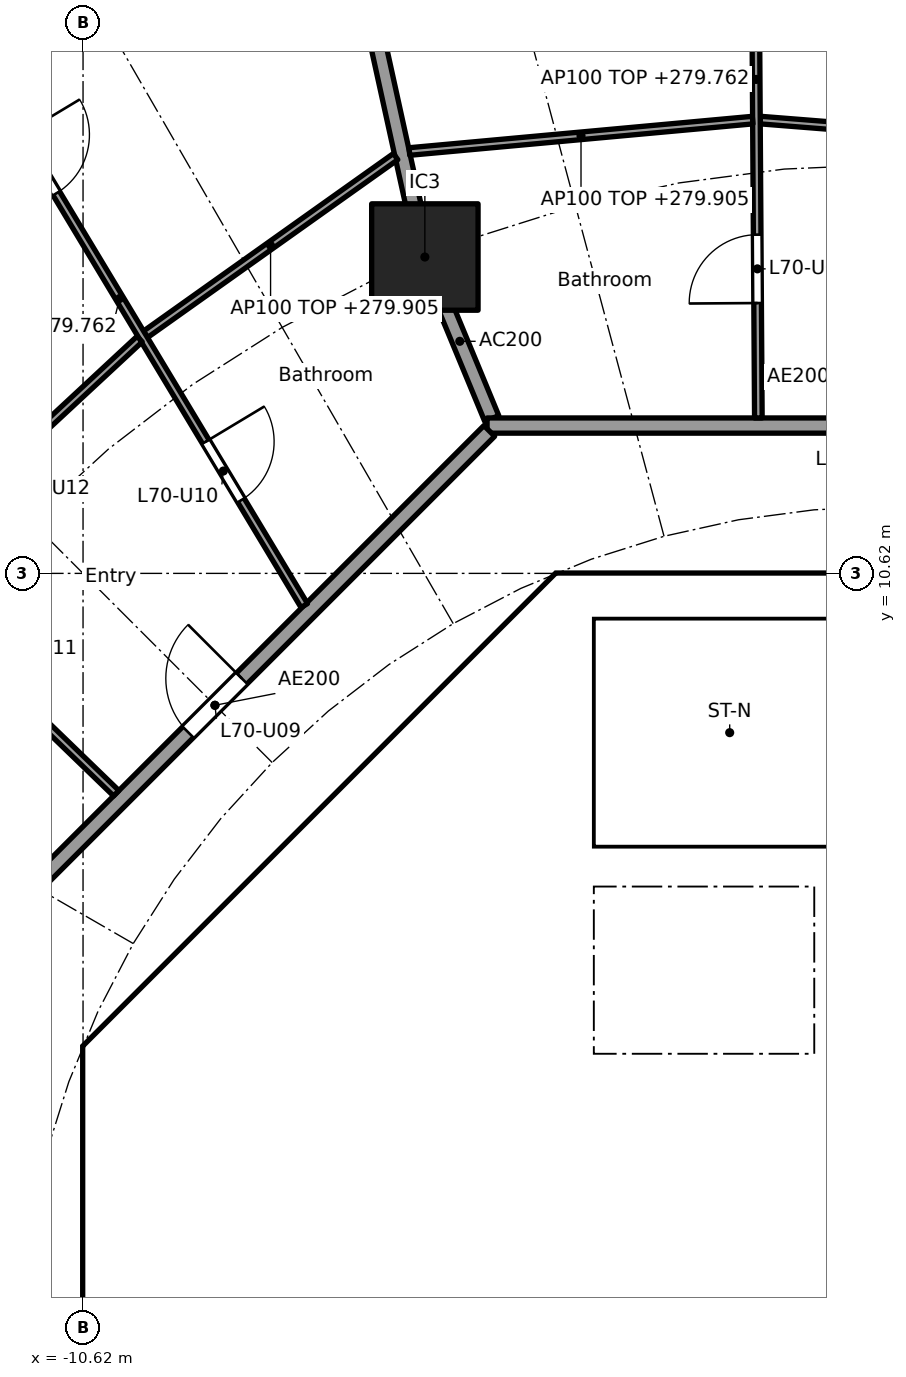
"""IFC4 building model, lengths in metres.
Left out: names, types, materials, properties, quantities, classifications, styles, units other than length and angle.
Written with IfcOpenShell. Run it as: python <this file> out.ifc"""

import sys

from ifc_helpers import new_model, si_unit, direction, frame, frame_2d, origin, origin_2d, place, context, subcontext, project, spatial, polyline, rectangle, outline, extrude, element, fill, save


model = new_model("IFC4")
c1 = context("Model", 3, precision=1e-05, world=origin(), true_north=direction((0.0, 1.0)))
c2 = subcontext(c1, "Body", "Model", "MODEL_VIEW")
j1 = project(units=[si_unit("LENGTHUNIT", "METRE"), si_unit("PLANEANGLEUNIT", "RADIAN")], contexts=[c1])
p1 = place(None, origin())
s1 = spatial("IfcSite", under=j1, at=p1, CompositionType="ELEMENT")
p2 = place(p1, origin())
s2 = spatial("IfcBuilding", under=s1, at=p2, CompositionType="ELEMENT")
p3 = place(p2, frame((0.0, 0.0, 277.0)))
s3 = spatial("IfcBuildingStorey", under=s2, at=p3, CompositionType="ELEMENT", Elevation=277.0)
p4 = place(p3, frame((-6.123, 14.782, 0.0), z_axis=(0.0, 0.0, 1.0), x_axis=(1.0, 0.0, 0.0)))
e1 = element("IfcColumn", 1, at=p4, inside=s3, PredefinedType="COLUMN", context=c2, shape_type="SweptSolid", body=[
    extrude(rectangle(XDim=1.4, YDim=1.4, at=origin_2d()), origin(), (0.0, 0.0, 1.0), 3.7),
])
p5 = place(p3, frame((-4.613, 9.988, 0.0), z_axis=(0.0, 0.0, 1.0), x_axis=(-0.707106781187, -0.707106781187, 0.0)))
e2 = element("IfcWall", 2, at=p5, inside=s3, PredefinedType="SHEAR", context=c2, shape_type="SweptSolid", body=[
    extrude(rectangle(XDim=7.602, YDim=0.6, at=frame_2d((3.801, 0.0))), origin(), (0.0, 0.0, 1.0), 3.44),
])
p6 = place(p5, frame((0.351, 0.0, 0.0)))
e3 = element("IfcOpeningElement", 3, at=p6, cuts=e2, PredefinedType="OPENING", context=c2, shape_type="SweptSolid", body=[
    extrude(rectangle(XDim=1.1, YDim=2.1, at=frame_2d((0.55, 1.05))), frame((0.0, 0.31, 0.0), z_axis=(0.0, -1.0, 0.0), x_axis=(1.0, 0.0, 0.0)), (0.0, 0.0, 1.0), 0.62),
])
p7 = place(p3, frame((-10.325, 3.801, 0.0), z_axis=(0.0, 0.0, 1.0), x_axis=(0.0, -1.0, 0.0)))
e4 = element("IfcWall", 4, at=p7, inside=s3, PredefinedType="SHEAR", context=c2, shape_type="SweptSolid", body=[
    extrude(rectangle(XDim=7.602, YDim=0.6, at=frame_2d((3.801, 0.0))), origin(), (0.0, 0.0, 1.0), 3.44),
])
p8 = place(p7, frame((0.651, 0.0, 0.0)))
e5 = element("IfcOpeningElement", 5, at=p8, cuts=e4, PredefinedType="OPENING", context=c2, shape_type="SweptSolid", body=[
    extrude(rectangle(XDim=1.5, YDim=2.1, at=frame_2d((0.75, 1.05))), frame((0.0, 0.31, 0.0), z_axis=(0.0, -1.0, 0.0), x_axis=(1.0, 0.0, 0.0)), (0.0, 0.0, 1.0), 0.62),
])
p9 = place(p7, frame((5.451, 0.0, 0.0)))
e6 = element("IfcOpeningElement", 6, at=p9, cuts=e4, PredefinedType="OPENING", context=c2, shape_type="SweptSolid", body=[
    extrude(rectangle(XDim=1.5, YDim=2.1, at=frame_2d((0.75, 1.05))), frame((0.0, 0.31, 0.0), z_axis=(0.0, -1.0, 0.0), x_axis=(1.0, 0.0, 0.0)), (0.0, 0.0, 1.0), 0.62),
])
p10 = place(p3, frame((-5.8, 4.3, 0.0), z_axis=(0.0, 0.0, 1.0), x_axis=(0.0, 1.0, 0.0)))
e7 = element("IfcWall", 7, at=p10, inside=s3, PredefinedType="PARTITIONING", context=c2, shape_type="SweptSolid", body=[
    extrude(rectangle(XDim=3.927, YDim=0.15, at=frame_2d((1.963, 0.0))), origin(), (0.0, 0.0, 1.0), 3.44),
])
p11 = place(p10, frame((0.262, 0.0, 0.0)))
e8 = element("IfcOpeningElement", 8, at=p11, cuts=e7, PredefinedType="OPENING", context=c2, shape_type="SweptSolid", body=[
    extrude(rectangle(XDim=0.9, YDim=2.1, at=frame_2d((0.45, 1.05))), frame((0.0, 0.085, 0.0), z_axis=(0.0, -1.0, 0.0), x_axis=(1.0, 0.0, 0.0)), (0.0, 0.0, 1.0), 0.17),
])
p12 = place(p10, frame((2.338, 0.0, 0.0)))
e9 = element("IfcOpeningElement", 9, at=p12, cuts=e7, PredefinedType="OPENING", context=c2, shape_type="SweptSolid", body=[
    extrude(rectangle(XDim=0.9, YDim=2.1, at=frame_2d((0.45, 1.05))), frame((0.0, 0.085, 0.0), z_axis=(0.0, -1.0, 0.0), x_axis=(1.0, 0.0, 0.0)), (0.0, 0.0, 1.0), 0.17),
])
p13 = place(p3, frame((-4.0, 4.3, 0.0), z_axis=(0.0, 0.0, 1.0), x_axis=(0.0, 1.0, 0.0)))
e10 = element("IfcWall", 10, at=p13, inside=s3, PredefinedType="SOLIDWALL", context=c2, shape_type="SweptSolid", body=[
    extrude(rectangle(XDim=2.2, YDim=0.2, at=frame_2d((1.1, 0.0))), origin(), (0.0, 0.0, 1.0), 3.44),
])
p14 = place(p13, frame((0.55, 0.0, 0.0)))
e11 = element("IfcOpeningElement", 11, at=p14, cuts=e10, PredefinedType="OPENING", context=c2, shape_type="SweptSolid", body=[
    extrude(rectangle(XDim=1.1, YDim=2.1, at=frame_2d((0.55, 1.05))), frame((0.0, 0.11, 0.0), z_axis=(0.0, -1.0, 0.0), x_axis=(1.0, 0.0, 0.0)), (0.0, 0.0, 1.0), 0.22),
])
p15 = place(p3, frame((-6.7, 2.0, 0.0), z_axis=(0.0, 0.0, 1.0), x_axis=(1.0, 0.0, 0.0)))
e12 = element("IfcWall", 12, at=p15, inside=s3, PredefinedType="SOLIDWALL", context=c2, shape_type="SweptSolid", body=[
    extrude(rectangle(XDim=13.4, YDim=0.2, at=frame_2d((6.7, 0.0))), origin(), (0.0, 0.0, 1.0), 3.44),
])
p16 = place(p15, frame((11.65, 0.0, 0.0)))
e13 = element("IfcOpeningElement", 13, at=p16, cuts=e12, PredefinedType="OPENING", context=c2, shape_type="SweptSolid", body=[
    extrude(rectangle(XDim=1.1, YDim=2.1, at=frame_2d((0.55, 1.05))), frame((0.0, 0.11, 0.0), z_axis=(0.0, -1.0, 0.0), x_axis=(1.0, 0.0, 0.0)), (0.0, 0.0, 1.0), 0.22),
])
p17 = place(p15, frame((1.85, 0.0, 0.0)))
e14 = element("IfcOpeningElement", 14, at=p17, cuts=e12, PredefinedType="OPENING", context=c2, shape_type="SweptSolid", body=[
    extrude(rectangle(XDim=0.9, YDim=2.1, at=frame_2d((0.45, 1.05))), frame((0.0, 0.11, 0.0), z_axis=(0.0, -1.0, 0.0), x_axis=(1.0, 0.0, 0.0)), (0.0, 0.0, 1.0), 0.22),
])
p18 = place(p15, frame((5.15, 0.0, 0.0)))
e15 = element("IfcOpeningElement", 15, at=p18, cuts=e12, PredefinedType="OPENING", context=c2, shape_type="SweptSolid", body=[
    extrude(rectangle(XDim=0.9, YDim=2.1, at=frame_2d((0.45, 1.05))), frame((0.0, 0.11, 0.0), z_axis=(0.0, -1.0, 0.0), x_axis=(1.0, 0.0, 0.0)), (0.0, 0.0, 1.0), 0.22),
])
p19 = place(p15, frame((8.45, 0.0, 0.0)))
e16 = element("IfcOpeningElement", 16, at=p19, cuts=e12, PredefinedType="OPENING", context=c2, shape_type="SweptSolid", body=[
    extrude(rectangle(XDim=0.9, YDim=2.1, at=frame_2d((0.45, 1.05))), frame((0.0, 0.11, 0.0), z_axis=(0.0, -1.0, 0.0), x_axis=(1.0, 0.0, 0.0)), (0.0, 0.0, 1.0), 0.22),
])
p20 = place(p3, origin())
e17 = element("IfcWall", 17, at=p20, inside=s3, PredefinedType="SHEAR", context=c2, shape_type="SweptSolid", body=[
    extrude(outline(polyline([(-10.2, 4.825), (-9.776, 4.401), (-10.025, 4.152), (-10.025, 3.801), (-10.625, 3.801), (-10.625, 4.401), (-10.2, 4.825)])), origin(), (0.0, 0.0, 1.0), 3.44),
])
p21 = place(p3, origin())
e18 = element("IfcWall", 18, at=p21, inside=s3, PredefinedType="SHEAR", context=c2, shape_type="SweptSolid", body=[
    extrude(outline(polyline([(-4.152, 10.025), (-4.401, 9.776), (-4.825, 10.2), (-4.401, 10.625), (4.401, 10.625), (4.825, 10.2), (4.401, 9.776), (4.152, 10.025), (-4.152, 10.025)])), origin(), (0.0, 0.0, 1.0), 3.44),
])
p22 = place(p3, frame((-10.025, 4.0, 0.0), z_axis=(0.0, 0.0, 1.0), x_axis=(1.0, 0.0, 0.0)))
e19 = element("IfcWall", 19, at=p22, inside=s3, PredefinedType="PARTITIONING", context=c2, shape_type="SweptSolid", body=[
    extrude(rectangle(XDim=3.325, YDim=0.2, at=frame_2d((1.662, 0.0))), origin(), (0.0, 0.0, 1.0), 3.44),
])
p23 = place(p3, frame((-8.301, 5.8, 0.0), z_axis=(0.0, 0.0, 1.0), x_axis=(1.0, 0.0, 0.0)))
e20 = element("IfcWall", 20, at=p23, inside=s3, PredefinedType="PARTITIONING", context=c2, shape_type="SweptSolid", body=[
    extrude(rectangle(XDim=2.426, YDim=0.15, at=frame_2d((1.213, 0.0))), origin(), (0.0, 0.0, 1.0), 3.44),
])
p24 = place(p3, frame((-0.9, 4.3, 0.0), z_axis=(0.0, 0.0, 1.0), x_axis=(0.0, 1.0, 0.0)))
e21 = element("IfcWall", 21, at=p24, inside=s3, PredefinedType="SOLIDWALL", context=c2, shape_type="SweptSolid", body=[
    extrude(rectangle(XDim=2.2, YDim=0.2, at=frame_2d((1.1, 0.0))), origin(), (0.0, 0.0, 1.0), 3.44),
])
p25 = place(p3, origin())
e22 = element("IfcWall", 22, at=p25, inside=s3, PredefinedType="SOLIDWALL", context=c2, shape_type="SweptSolid", body=[
    extrude(outline(polyline([(-6.7, 4.3), (6.7, 4.3), (6.7, 2.1), (6.5, 2.1), (6.5, 4.1), (4.5, 4.1), (4.5, 2.1), (4.3, 2.1), (4.3, 4.1), (0.1, 4.1), (0.1, 2.1), (-0.1, 2.1), (-0.1, 4.1), (-2.1, 4.1), (-2.1, 2.1), (-2.3, 2.1), (-2.3, 4.1), (-6.5, 4.1), (-6.5, 2.1), (-6.7, 2.1), (-6.7, 4.3)])), origin(), (0.0, 0.0, 1.0), 3.44),
])
p26 = place(p3, origin())
e23 = element("IfcWall", 23, at=p26, inside=s3, PredefinedType="SOLIDWALL", context=c2, shape_type="SweptSolid", body=[
    extrude(outline(polyline([(-3.9, 7.025), (-4.1, 7.025), (-4.1, 10.025), (-3.9, 10.025), (-3.9, 7.025)])), origin(), (0.0, 0.0, 1.0), 3.44),
])
p27 = place(p3, origin())
e24 = element("IfcWall", 24, at=p27, inside=s3, PredefinedType="SOLIDWALL", context=c2, shape_type="SweptSolid", body=[
    extrude(outline(polyline([(4.1, 6.5), (-4.1, 6.5), (-4.1, 7.025), (4.1, 7.025), (4.1, 6.5)])), origin(), (0.0, 0.0, 1.0), 3.44),
])
p28 = place(p3, frame((-5.243, 12.657, 0.0), z_axis=(0.0, 0.0, 1.0), x_axis=(-0.38273085373, 0.923859888513, 0.0)))
e25 = element("IfcWall", 25, at=p28, inside=s3, PredefinedType="PARTITIONING", context=c2, shape_type="SweptSolid", body=[
    extrude(rectangle(XDim=2.199, YDim=0.2, at=frame_2d((1.1, 0.0))), origin(), (0.0, 0.0, 1.0), 3.44),
])
p29 = place(p3, frame((-6.134, 14.831, 0.0), z_axis=(0.0, 0.0, 1.0), x_axis=(-0.214842475666, 0.976648714047, 0.0)))
e26 = element("IfcWall", 26, at=p29, inside=s3, PredefinedType="PARTITIONING", context=c2, shape_type="SweptSolid", body=[
    extrude(rectangle(XDim=6.031, YDim=0.2, at=frame_2d((3.015, 0.0))), origin(), (0.0, 0.0, 1.0), 2.905),
])
p30 = place(p3, frame((5.104, 12.565, 0.0), z_axis=(0.0, 0.0, 1.0), x_axis=(-1.0, 0.0, 0.0)))
e27 = element("IfcWall", 27, at=p30, inside=s3, PredefinedType="PARTITIONING", context=c2, shape_type="SweptSolid", body=[
    extrude(rectangle(XDim=10.409, YDim=0.2, at=frame_2d((5.205, 0.0))), origin(), (0.0, 0.0, 1.0), 3.44),
])
p31 = place(p30, frame((4.604, 0.0, 0.0)))
e28 = element("IfcOpeningElement", 28, at=p31, cuts=e27, PredefinedType="OPENING", context=c2, shape_type="SweptSolid", body=[
    extrude(rectangle(XDim=1.0, YDim=2.1, at=frame_2d((0.5, 1.05))), frame((0.0, 0.11, 0.0), z_axis=(0.0, -1.0, 0.0), x_axis=(1.0, 0.0, 0.0)), (0.0, 0.0, 1.0), 0.22),
])
p32 = place(p3, frame((-5.275, 12.494, 0.0), z_axis=(0.0, 0.0, 1.0), x_axis=(-0.707106781187, -0.707106781187, 0.0)))
e29 = element("IfcWall", 29, at=p32, inside=s3, PredefinedType="PARTITIONING", context=c2, shape_type="SweptSolid", body=[
    extrude(rectangle(XDim=10.209, YDim=0.2, at=frame_2d((5.104, 0.0))), origin(), (0.0, 0.0, 1.0), 3.44),
])
p33 = place(p32, frame((4.604, 0.0, 0.0)))
e30 = element("IfcOpeningElement", 30, at=p33, cuts=e29, PredefinedType="OPENING", context=c2, shape_type="SweptSolid", body=[
    extrude(rectangle(XDim=1.0, YDim=2.1, at=frame_2d((0.5, 1.05))), frame((0.0, 0.11, 0.0), z_axis=(0.0, -1.0, 0.0), x_axis=(1.0, 0.0, 0.0)), (0.0, 0.0, 1.0), 0.22),
])
p34 = place(p3, frame((2.713, 16.233, 0.0), z_axis=(0.0, 0.0, 1.0), x_axis=(-0.996870142942, 0.079056423588, 0.0)))
e31 = element("IfcWall", 31, at=p34, inside=s3, PredefinedType="PARTITIONING", context=c2, shape_type="SweptSolid", body=[
    extrude(rectangle(XDim=4.438, YDim=0.1, at=frame_2d((2.219, 0.0))), origin(), (0.0, 0.0, 1.0), 2.905),
])
p35 = place(p34, frame((1.794, 0.0, 0.0)))
e32 = element("IfcOpeningElement", 32, at=p35, cuts=e31, PredefinedType="OPENING", context=c2, shape_type="SweptSolid", body=[
    extrude(rectangle(XDim=0.9, YDim=2.1, at=frame_2d((0.45, 1.05))), frame((0.0, 0.06, 0.0), z_axis=(0.0, -1.0, 0.0), x_axis=(1.0, 0.0, 0.0)), (0.0, 0.0, 1.0), 0.12),
])
p36 = place(p3, frame((-1.736, 12.665, 0.0), z_axis=(0.0, 0.0, 1.0), x_axis=(-0.00646827636, 0.999979080482, 0.0)))
e33 = element("IfcWall", 33, at=p36, inside=s3, PredefinedType="PARTITIONING", context=c2, shape_type="SweptSolid", body=[
    extrude(rectangle(XDim=8.908, YDim=0.1, at=frame_2d((4.454, 0.0))), origin(), (0.0, 0.0, 1.0), 2.762),
])
p37 = place(p36, frame((1.512, 0.0, 0.0)))
e34 = element("IfcOpeningElement", 34, at=p37, cuts=e33, PredefinedType="OPENING", context=c2, shape_type="SweptSolid", body=[
    extrude(rectangle(XDim=0.9, YDim=2.1, at=frame_2d((0.45, 1.05))), frame((0.0, 0.06, 0.0), z_axis=(0.0, -1.0, 0.0), x_axis=(1.0, 0.0, 0.0)), (0.0, 0.0, 1.0), 0.12),
])
p38 = place(p36, frame((5.965, 0.0, 0.0)))
e35 = element("IfcOpeningElement", 35, at=p38, cuts=e33, PredefinedType="OPENING", context=c2, shape_type="SweptSolid", body=[
    extrude(rectangle(XDim=0.9, YDim=2.1, at=frame_2d((0.45, 1.05))), frame((0.0, 0.06, 0.0), z_axis=(0.0, -1.0, 0.0), x_axis=(1.0, 0.0, 0.0)), (0.0, 0.0, 1.0), 0.12),
])
p39 = place(p3, frame((-1.811, 16.583, 0.0), z_axis=(0.0, 0.0, 1.0), x_axis=(-0.995842301034, -0.091093970555, 0.0)))
e36 = element("IfcWall", 36, at=p39, inside=s3, PredefinedType="PARTITIONING", context=c2, shape_type="SweptSolid", body=[
    extrude(rectangle(XDim=4.535, YDim=0.1, at=frame_2d((2.267, 0.0))), origin(), (0.0, 0.0, 1.0), 2.905),
])
p40 = place(p3, frame((-6.508, 16.103, 0.0), z_axis=(0.0, 0.0, 1.0), x_axis=(-0.815202203556, -0.579176456114, 0.0)))
e37 = element("IfcWall", 37, at=p40, inside=s3, PredefinedType="PARTITIONING", context=c2, shape_type="SweptSolid", body=[
    extrude(rectangle(XDim=4.036, YDim=0.1, at=frame_2d((2.018, 0.0))), origin(), (0.0, 0.0, 1.0), 2.905),
])
p41 = place(p3, frame((-7.709, 10.197, 0.0), z_axis=(0.0, 0.0, 1.0), x_axis=(-0.515516160663, 0.856879856278, 0.0)))
e38 = element("IfcWall", 38, at=p41, inside=s3, PredefinedType="PARTITIONING", context=c2, shape_type="SweptSolid", body=[
    extrude(rectangle(XDim=9.426, YDim=0.1, at=frame_2d((4.713, 0.0))), origin(), (0.0, 0.0, 1.0), 2.762),
])
p42 = place(p41, frame((1.615, 0.0, 0.0)))
e39 = element("IfcOpeningElement", 39, at=p42, cuts=e38, PredefinedType="OPENING", context=c2, shape_type="SweptSolid", body=[
    extrude(rectangle(XDim=0.9, YDim=2.1, at=frame_2d((0.45, 1.05))), frame((0.0, 0.06, 0.0), z_axis=(0.0, -1.0, 0.0), x_axis=(1.0, 0.0, 0.0)), (0.0, 0.0, 1.0), 0.12),
])
p43 = place(p41, frame((6.328, 0.0, 0.0)))
e40 = element("IfcOpeningElement", 40, at=p43, cuts=e38, PredefinedType="OPENING", context=c2, shape_type="SweptSolid", body=[
    extrude(rectangle(XDim=0.9, YDim=2.1, at=frame_2d((0.45, 1.05))), frame((0.0, 0.06, 0.0), z_axis=(0.0, -1.0, 0.0), x_axis=(1.0, 0.0, 0.0)), (0.0, 0.0, 1.0), 0.12),
])
p44 = place(p3, frame((-9.875, 13.702, 0.0), z_axis=(0.0, 0.0, 1.0), x_axis=(-0.732618266441, -0.680639754699, 0.0)))
e41 = element("IfcWall", 41, at=p44, inside=s3, PredefinedType="PARTITIONING", context=c2, shape_type="SweptSolid", body=[
    extrude(rectangle(XDim=4.467, YDim=0.1, at=frame_2d((2.233, 0.0))), origin(), (0.0, 0.0, 1.0), 2.905),
])
p45 = place(p44, frame((1.783, 0.0, 0.0)))
e42 = element("IfcOpeningElement", 42, at=p45, cuts=e41, PredefinedType="OPENING", context=c2, shape_type="SweptSolid", body=[
    extrude(rectangle(XDim=0.9, YDim=2.1, at=frame_2d((0.45, 1.05))), frame((0.0, 0.06, 0.0), z_axis=(0.0, -1.0, 0.0), x_axis=(1.0, 0.0, 0.0)), (0.0, 0.0, 1.0), 0.12),
])
p46 = place(p3, frame((-10.183, 7.727, 0.0), z_axis=(0.0, 0.0, 1.0), x_axis=(-0.719063433856, 0.694944442449, 0.0)))
e43 = element("IfcWall", 43, at=p46, inside=s3, PredefinedType="PARTITIONING", context=c2, shape_type="SweptSolid", body=[
    extrude(rectangle(XDim=9.535, YDim=0.1, at=frame_2d((4.768, 0.0))), origin(), (0.0, 0.0, 1.0), 2.762),
])
p47 = place(p46, frame((1.637, 0.0, 0.0)))
e44 = element("IfcOpeningElement", 44, at=p47, cuts=e43, PredefinedType="OPENING", context=c2, shape_type="SweptSolid", body=[
    extrude(rectangle(XDim=0.9, YDim=2.1, at=frame_2d((0.45, 1.05))), frame((0.0, 0.06, 0.0), z_axis=(0.0, -1.0, 0.0), x_axis=(1.0, 0.0, 0.0)), (0.0, 0.0, 1.0), 0.12),
])
p48 = place(p46, frame((6.405, 0.0, 0.0)))
e45 = element("IfcOpeningElement", 45, at=p48, cuts=e43, PredefinedType="OPENING", context=c2, shape_type="SweptSolid", body=[
    extrude(rectangle(XDim=0.9, YDim=2.1, at=frame_2d((0.45, 1.05))), frame((0.0, 0.06, 0.0), z_axis=(0.0, -1.0, 0.0), x_axis=(1.0, 0.0, 0.0)), (0.0, 0.0, 1.0), 0.12),
])
p49 = place(p14, origin())
e46 = element("IfcDoor", 46, at=p49, inside=s3, OperationType="DOUBLE_DOOR_SLIDING", PredefinedType="DOOR", context=c2, shape_type="SweptSolid", body=[
    extrude(rectangle(XDim=1.1, YDim=2.1, at=frame_2d((0.55, 1.05))), frame((0.0, 0.025, 0.0), z_axis=(0.0, -1.0, 0.0), x_axis=(1.0, 0.0, 0.0)), (0.0, 0.0, 1.0), 0.05),
])
fill(e11, e46)
p50 = place(p11, origin())
e47 = element("IfcDoor", 47, at=p50, inside=s3, OperationType="SINGLE_SWING_RIGHT", PredefinedType="DOOR", context=c2, shape_type="SweptSolid", body=[
    extrude(rectangle(XDim=0.9, YDim=2.1, at=frame_2d((0.45, 1.05))), frame((0.0, 0.025, 0.0), z_axis=(0.0, -1.0, 0.0), x_axis=(1.0, 0.0, 0.0)), (0.0, 0.0, 1.0), 0.05),
])
fill(e8, e47)
p51 = place(p12, origin())
e48 = element("IfcDoor", 48, at=p51, inside=s3, OperationType="SINGLE_SWING_RIGHT", PredefinedType="DOOR", context=c2, shape_type="SweptSolid", body=[
    extrude(rectangle(XDim=0.9, YDim=2.1, at=frame_2d((0.45, 1.05))), frame((0.0, 0.025, 0.0), z_axis=(0.0, -1.0, 0.0), x_axis=(1.0, 0.0, 0.0)), (0.0, 0.0, 1.0), 0.05),
])
fill(e9, e48)
p52 = place(p17, origin())
e49 = element("IfcDoor", 49, at=p52, inside=s3, OperationType="SINGLE_SWING_LEFT", PredefinedType="DOOR", context=c2, shape_type="SweptSolid", body=[
    extrude(rectangle(XDim=0.9, YDim=2.1, at=frame_2d((0.45, 1.05))), frame((0.0, 0.025, 0.0), z_axis=(0.0, -1.0, 0.0), x_axis=(1.0, 0.0, 0.0)), (0.0, 0.0, 1.0), 0.05),
])
fill(e14, e49)
p53 = place(p18, origin())
e50 = element("IfcDoor", 50, at=p53, inside=s3, OperationType="SINGLE_SWING_LEFT", PredefinedType="DOOR", context=c2, shape_type="SweptSolid", body=[
    extrude(rectangle(XDim=0.9, YDim=2.1, at=frame_2d((0.45, 1.05))), frame((0.0, 0.025, 0.0), z_axis=(0.0, -1.0, 0.0), x_axis=(1.0, 0.0, 0.0)), (0.0, 0.0, 1.0), 0.05),
])
fill(e15, e50)
p54 = place(p8, origin())
e51 = element("IfcDoor", 51, at=p54, inside=s3, OperationType="DOUBLE_DOOR_SINGLE_SWING", PredefinedType="DOOR", context=c2, shape_type="SweptSolid", body=[
    extrude(rectangle(XDim=1.5, YDim=2.1, at=frame_2d((0.75, 1.05))), frame((0.0, 0.025, 0.0), z_axis=(0.0, -1.0, 0.0), x_axis=(1.0, 0.0, 0.0)), (0.0, 0.0, 1.0), 0.05),
])
fill(e5, e51)
p55 = place(p6, origin())
e52 = element("IfcDoor", 52, at=p55, inside=s3, OperationType="SINGLE_SWING_RIGHT", PredefinedType="DOOR", context=c2, shape_type="SweptSolid", body=[
    extrude(rectangle(XDim=1.1, YDim=2.1, at=frame_2d((0.55, 1.05))), frame((0.0, 0.025, 0.0), z_axis=(0.0, -1.0, 0.0), x_axis=(1.0, 0.0, 0.0)), (0.0, 0.0, 1.0), 0.05),
])
fill(e3, e52)
p56 = place(p37, origin())
e53 = element("IfcDoor", 53, at=p56, inside=s3, OperationType="SINGLE_SWING_LEFT", PredefinedType="DOOR", context=c2, shape_type="SweptSolid", body=[
    extrude(rectangle(XDim=0.9, YDim=2.1, at=frame_2d((0.45, 1.05))), frame((0.0, 0.025, 0.0), z_axis=(0.0, -1.0, 0.0), x_axis=(1.0, 0.0, 0.0)), (0.0, 0.0, 1.0), 0.05),
])
fill(e34, e53)
p57 = place(p33, frame((1.0, 0.0, 0.0), x_axis=(-1.0, 0.0, 0.0)))
e54 = element("IfcDoor", 54, at=p57, inside=s3, OperationType="SINGLE_SWING_RIGHT", PredefinedType="DOOR", context=c2, shape_type="SweptSolid", body=[
    extrude(rectangle(XDim=1.0, YDim=2.1, at=frame_2d((0.5, 1.05))), frame((0.0, 0.025, 0.0), z_axis=(0.0, -1.0, 0.0), x_axis=(1.0, 0.0, 0.0)), (0.0, 0.0, 1.0), 0.05),
])
fill(e30, e54)
p58 = place(p42, frame((0.9, 0.0, 0.0), x_axis=(-1.0, 0.0, 0.0)))
e55 = element("IfcDoor", 55, at=p58, inside=s3, OperationType="SINGLE_SWING_LEFT", PredefinedType="DOOR", context=c2, shape_type="SweptSolid", body=[
    extrude(rectangle(XDim=0.9, YDim=2.1, at=frame_2d((0.45, 1.05))), frame((0.0, 0.025, 0.0), z_axis=(0.0, -1.0, 0.0), x_axis=(1.0, 0.0, 0.0)), (0.0, 0.0, 1.0), 0.05),
])
fill(e39, e55)
p59 = place(p43, frame((0.9, 0.0, 0.0), x_axis=(-1.0, 0.0, 0.0)))
e56 = element("IfcDoor", 56, at=p59, inside=s3, OperationType="SINGLE_SWING_LEFT", PredefinedType="DOOR", context=c2, shape_type="SweptSolid", body=[
    extrude(rectangle(XDim=0.9, YDim=2.1, at=frame_2d((0.45, 1.05))), frame((0.0, 0.025, 0.0), z_axis=(0.0, -1.0, 0.0), x_axis=(1.0, 0.0, 0.0)), (0.0, 0.0, 1.0), 0.05),
])
fill(e40, e56)
save(model, sys.argv[1])
